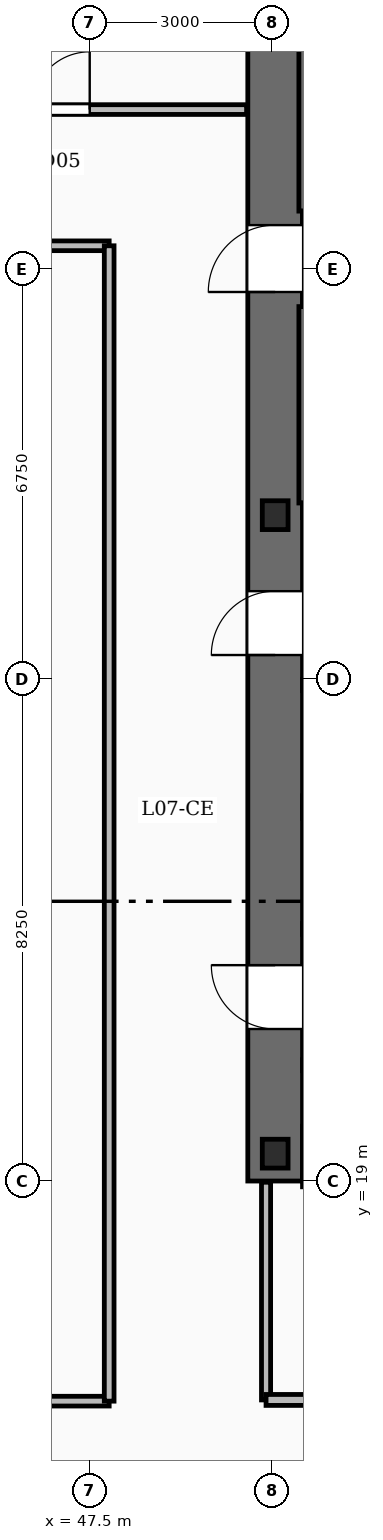
"""IFC4 building model, lengths in metres.
Left out: names, types, materials, properties, quantities, classifications, styles, units other than length and angle.
Written with IfcOpenShell. Run it as: python <this file> out.ifc"""

import sys

from ifc_helpers import new_model, si_unit, direction, frame, frame_2d, origin, origin_2d, place, context, subcontext, project, spatial, rectangle, i_section, extrude, element, fill, save


model = new_model("IFC4")
c1 = context("Model", 3, precision=1e-05, world=origin(), true_north=direction((0.0, 1.0)))
c2 = subcontext(c1, "Body", "Model", "MODEL_VIEW")
j1 = project(units=[si_unit("LENGTHUNIT", "METRE"), si_unit("PLANEANGLEUNIT", "RADIAN")], contexts=[c1])
p1 = place(None, origin())
s1 = spatial("IfcSite", under=j1, at=p1, CompositionType="ELEMENT")
p2 = place(p1, origin())
s2 = spatial("IfcBuilding", under=s1, at=p2, CompositionType="ELEMENT")
p3 = place(p2, frame((0.0, 0.0, 42.0)))
s3 = spatial("IfcBuildingStorey", under=s2, at=p3, CompositionType="ELEMENT", Elevation=42.0)
p4 = place(p3, frame((50.55, 19.0, -0.45), z_axis=(0.0, 0.0, 1.0), x_axis=(0.0, 1.0, 0.0)))
e1 = element("IfcWall", 1, at=p4, inside=s3, PredefinedType="SHEAR", context=c2, shape_type="SweptSolid", body=[
    extrude(rectangle(XDim=20.8, YDim=0.9, at=frame_2d((10.4, 0.0))), origin(), (0.0, 0.0, 1.0), 3.93),
])
p5 = place(p4, frame((2.5, 0.0, 0.45)))
e2 = element("IfcOpeningElement", 2, at=p5, cuts=e1, PredefinedType="OPENING", context=c2, shape_type="SweptSolid", body=[
    extrude(rectangle(XDim=1.05, YDim=2.15, at=frame_2d((0.525, 1.075))), frame((0.0, 0.46, 0.0), z_axis=(0.0, -1.0, 0.0), x_axis=(1.0, 0.0, 0.0)), (0.0, 0.0, 1.0), 0.92),
])
p6 = place(p4, frame((8.65, 0.0, 0.45)))
e3 = element("IfcOpeningElement", 3, at=p6, cuts=e1, PredefinedType="OPENING", context=c2, shape_type="SweptSolid", body=[
    extrude(rectangle(XDim=1.05, YDim=2.15, at=frame_2d((0.525, 1.075))), frame((0.0, 0.46, 0.0), z_axis=(0.0, -1.0, 0.0), x_axis=(1.0, 0.0, 0.0)), (0.0, 0.0, 1.0), 0.92),
])
p7 = place(p4, frame((14.62, 0.0, 0.45)))
e4 = element("IfcOpeningElement", 4, at=p7, cuts=e1, PredefinedType="OPENING", context=c2, shape_type="SweptSolid", body=[
    extrude(rectangle(XDim=1.1, YDim=2.15, at=frame_2d((0.55, 1.075))), frame((0.0, 0.46, 0.0), z_axis=(0.0, -1.0, 0.0), x_axis=(1.0, 0.0, 0.0)), (0.0, 0.0, 1.0), 0.92),
])
p8 = place(p3, frame((51.0, 19.45, -0.45), z_axis=(0.0, 0.0, 1.0), x_axis=(1.0, 0.0, 0.0)))
e5 = element("IfcWall", 5, at=p8, inside=s3, PredefinedType="SHEAR", context=c2, shape_type="SweptSolid", body=[
    extrude(rectangle(XDim=8.9, YDim=0.9, at=frame_2d((4.45, 0.0))), origin(), (0.0, 0.0, 1.0), 3.93),
])
for number, where, z_axis, x_axis in (
    (6, (50.55, 19.45, -0.45), (0.0, 0.0, 1.0), (1.0, 0.0, 0.0)),
    (7, (50.55, 29.95, -0.45), (0.0, 0.0, 1.0), (1.0, 0.0, 0.0)),
):
    element("IfcColumn", number, at=place(p3, frame(where, z_axis=z_axis, x_axis=x_axis)), inside=s3, PredefinedType="COLUMN", context=c2, shape_type="SweptSolid", body=[
        extrude(i_section(OverallWidth=0.424, OverallDepth=0.474, WebThickness=0.048, FlangeThickness=0.077, FilletRadius=0.02, at=origin_2d()), origin(), (0.0, 0.0, 1.0), 3.93),
    ])
p9 = place(p3, frame((59.9, 30.03, 0.0), z_axis=(0.0, 0.0, 1.0), x_axis=(-1.0, 0.0, 0.0)))
e8 = element("IfcWall", 8, at=p9, inside=s3, PredefinedType="SOLIDWALL", context=c2, shape_type="SweptSolid", body=[
    extrude(rectangle(XDim=8.9, YDim=0.24, at=frame_2d((4.45, 0.0))), origin(), (0.0, 0.0, 1.0), 3.48),
])
p10 = place(p9, frame((7.38, 0.0, 0.0)))
e9 = element("IfcOpeningElement", 9, at=p10, cuts=e8, PredefinedType="OPENING", context=c2, shape_type="SweptSolid", body=[
    extrude(rectangle(XDim=1.1, YDim=2.15, at=frame_2d((0.55, 1.075))), frame((0.0, 0.13, 0.0), z_axis=(0.0, -1.0, 0.0), x_axis=(1.0, 0.0, 0.0)), (0.0, 0.0, 1.0), 0.26),
])
p11 = place(p3, frame((51.0, 33.5, 0.0), z_axis=(0.0, 0.0, 1.0), x_axis=(1.0, 0.0, 0.0)))
e10 = element("IfcWall", 10, at=p11, inside=s3, PredefinedType="SOLIDWALL", context=c2, shape_type="SweptSolid", body=[
    extrude(rectangle(XDim=8.9, YDim=0.24, at=frame_2d((4.45, 0.0))), origin(), (0.0, 0.0, 1.0), 3.48),
])
p12 = place(p3, frame((51.06, 30.15, 0.0), z_axis=(0.0, 0.0, 1.0), x_axis=(0.0, 1.0, 0.0)))
e11 = element("IfcWall", 11, at=p12, inside=s3, PredefinedType="SOLIDWALL", context=c2, shape_type="SweptSolid", body=[
    extrude(rectangle(XDim=3.23, YDim=0.24, at=frame_2d((1.615, 0.0))), origin(), (0.0, 0.0, 1.0), 3.48),
])
p13 = place(p3, frame((59.9, 34.83, 0.0), z_axis=(0.0, 0.0, 1.0), x_axis=(-1.0, 0.0, 0.0)))
e12 = element("IfcWall", 12, at=p13, inside=s3, PredefinedType="SOLIDWALL", context=c2, shape_type="SweptSolid", body=[
    extrude(rectangle(XDim=8.9, YDim=0.24, at=frame_2d((4.45, 0.0))), origin(), (0.0, 0.0, 1.0), 3.48),
])
p14 = place(p13, frame((7.42, 0.0, 0.0)))
e13 = element("IfcOpeningElement", 13, at=p14, cuts=e12, PredefinedType="OPENING", context=c2, shape_type="SweptSolid", body=[
    extrude(rectangle(XDim=1.1, YDim=2.15, at=frame_2d((0.55, 1.075))), frame((0.0, 0.13, 0.0), z_axis=(0.0, -1.0, 0.0), x_axis=(1.0, 0.0, 0.0)), (0.0, 0.0, 1.0), 0.26),
])
p15 = place(p3, frame((51.06, 34.95, 0.0), z_axis=(0.0, 0.0, 1.0), x_axis=(0.0, 1.0, 0.0)))
e14 = element("IfcWall", 14, at=p15, inside=s3, PredefinedType="SOLIDWALL", context=c2, shape_type="SweptSolid", body=[
    extrude(rectangle(XDim=3.15, YDim=0.24, at=frame_2d((1.575, 0.0))), origin(), (0.0, 0.0, 1.0), 3.48),
])
p16 = place(p3, frame((51.0, 20.905, 0.0), z_axis=(0.0, 0.0, 1.0), x_axis=(1.0, 0.0, 0.0)))
e15 = element("IfcWall", 15, at=p16, inside=s3, PredefinedType="SOLIDWALL", context=c2, shape_type="SweptSolid", body=[
    extrude(rectangle(XDim=2.79, YDim=0.18, at=frame_2d((1.395, 0.0))), origin(), (0.0, 0.0, 1.0), 3.48),
])
p17 = place(p16, frame((0.86, 0.0, 0.0)))
e16 = element("IfcOpeningElement", 16, at=p17, cuts=e15, PredefinedType="OPENING", context=c2, shape_type="SweptSolid", body=[
    extrude(rectangle(XDim=1.2, YDim=2.2, at=frame_2d((0.6, 1.1))), frame((0.0, 0.1, 0.0), z_axis=(0.0, -1.0, 0.0), x_axis=(1.0, 0.0, 0.0)), (0.0, 0.0, 1.0), 0.2),
])
p18 = place(p3, frame((51.0, 18.995, 0.0), z_axis=(0.0, 0.0, 1.0), x_axis=(1.0, 0.0, 0.0)))
e17 = element("IfcWall", 17, at=p18, inside=s3, PredefinedType="SOLIDWALL", context=c2, shape_type="SweptSolid", body=[
    extrude(rectangle(XDim=2.79, YDim=0.18, at=frame_2d((1.395, 0.0))), origin(), (0.0, 0.0, 1.0), 3.48),
])
p19 = place(p3, frame((51.0, 25.055, 0.0), z_axis=(0.0, 0.0, 1.0), x_axis=(1.0, 0.0, 0.0)))
e18 = element("IfcWall", 18, at=p19, inside=s3, PredefinedType="SOLIDWALL", context=c2, shape_type="SweptSolid", body=[
    extrude(rectangle(XDim=2.778, YDim=0.18, at=frame_2d((1.389, 0.0))), origin(), (0.0, 0.0, 1.0), 3.48),
])
p20 = place(p3, frame((51.0, 23.145, 0.0), z_axis=(0.0, 0.0, 1.0), x_axis=(1.0, 0.0, 0.0)))
e19 = element("IfcWall", 19, at=p20, inside=s3, PredefinedType="SOLIDWALL", context=c2, shape_type="SweptSolid", body=[
    extrude(rectangle(XDim=2.778, YDim=0.18, at=frame_2d((1.389, 0.0))), origin(), (0.0, 0.0, 1.0), 3.48),
])
p21 = place(p20, frame((0.86, 0.0, 0.0)))
e20 = element("IfcOpeningElement", 20, at=p21, cuts=e19, PredefinedType="OPENING", context=c2, shape_type="SweptSolid", body=[
    extrude(rectangle(XDim=1.2, YDim=2.2, at=frame_2d((0.6, 1.1))), frame((0.0, 0.1, 0.0), z_axis=(0.0, -1.0, 0.0), x_axis=(1.0, 0.0, 0.0)), (0.0, 0.0, 1.0), 0.2),
])
p22 = place(p3, frame((51.0, 27.155, 0.0), z_axis=(0.0, 0.0, 1.0), x_axis=(1.0, 0.0, 0.0)))
e21 = element("IfcWall", 21, at=p22, inside=s3, PredefinedType="SOLIDWALL", context=c2, shape_type="SweptSolid", body=[
    extrude(rectangle(XDim=2.865, YDim=0.18, at=frame_2d((1.433, 0.0))), origin(), (0.0, 0.0, 1.0), 3.48),
])
p23 = place(p22, frame((0.785, 0.0, 0.0)))
e22 = element("IfcOpeningElement", 22, at=p23, cuts=e21, PredefinedType="OPENING", context=c2, shape_type="SweptSolid", body=[
    extrude(rectangle(XDim=1.35, YDim=2.3, at=frame_2d((0.675, 1.15))), frame((0.0, 0.1, 0.0), z_axis=(0.0, -1.0, 0.0), x_axis=(1.0, 0.0, 0.0)), (0.0, 0.0, 1.0), 0.2),
])
p24 = place(p3, frame((51.0, 25.245, 0.0), z_axis=(0.0, 0.0, 1.0), x_axis=(1.0, 0.0, 0.0)))
e23 = element("IfcWall", 23, at=p24, inside=s3, PredefinedType="SOLIDWALL", context=c2, shape_type="SweptSolid", body=[
    extrude(rectangle(XDim=2.865, YDim=0.18, at=frame_2d((1.433, 0.0))), origin(), (0.0, 0.0, 1.0), 3.48),
])
p25 = place(p3, frame((50.4, 15.4, 0.0), z_axis=(0.0, 0.0, 1.0), x_axis=(1.0, 0.0, 0.0)))
e24 = element("IfcWall", 24, at=p25, inside=s3, PredefinedType="SOLIDWALL", context=c2, shape_type="SweptSolid", body=[
    extrude(rectangle(XDim=10.0, YDim=0.18, at=frame_2d((5.0, 0.0))), origin(), (0.0, 0.0, 1.0), 2.54),
])
p26 = place(p25, frame((1.19, 0.0, 0.0)))
e25 = element("IfcOpeningElement", 25, at=p26, cuts=e24, PredefinedType="OPENING", context=c2, shape_type="SweptSolid", body=[
    extrude(rectangle(XDim=0.92, YDim=2.1, at=frame_2d((0.46, 1.05))), frame((0.0, 0.1, 0.0), z_axis=(0.0, -1.0, 0.0), x_axis=(1.0, 0.0, 0.0)), (0.0, 0.0, 1.0), 0.2),
])
p27 = place(p25, frame((4.54, 0.0, 0.0)))
e26 = element("IfcOpeningElement", 26, at=p27, cuts=e24, PredefinedType="OPENING", context=c2, shape_type="SweptSolid", body=[
    extrude(rectangle(XDim=0.92, YDim=2.1, at=frame_2d((0.46, 1.05))), frame((0.0, 0.1, 0.0), z_axis=(0.0, -1.0, 0.0), x_axis=(1.0, 0.0, 0.0)), (0.0, 0.0, 1.0), 0.2),
])
p28 = place(p25, frame((7.92, 0.0, 0.0)))
e27 = element("IfcOpeningElement", 27, at=p28, cuts=e24, PredefinedType="OPENING", context=c2, shape_type="SweptSolid", body=[
    extrude(rectangle(XDim=0.86, YDim=2.05, at=frame_2d((0.43, 1.025))), frame((0.0, 0.1, 0.0), z_axis=(0.0, -1.0, 0.0), x_axis=(1.0, 0.0, 0.0)), (0.0, 0.0, 1.0), 0.2),
])
p29 = place(p3, frame((50.4, 15.4, 0.0), z_axis=(0.0, 0.0, 1.0), x_axis=(0.0, 1.0, 0.0)))
e28 = element("IfcWall", 28, at=p29, inside=s3, PredefinedType="PARTITIONING", context=c2, shape_type="SweptSolid", body=[
    extrude(rectangle(XDim=3.58, YDim=0.15, at=frame_2d((1.79, 0.0))), origin(), (0.0, 0.0, 1.0), 2.54),
])
p30 = place(p3, frame((24.82, 36.62, 0.0), z_axis=(0.0, 0.0, 1.0), x_axis=(1.0, 0.0, 0.0)))
e29 = element("IfcWall", 29, at=p30, inside=s3, PredefinedType="PARTITIONING", context=c2, shape_type="SweptSolid", body=[
    extrude(rectangle(XDim=25.26, YDim=0.16, at=frame_2d((12.63, 0.0))), origin(), (0.0, 0.0, 1.0), 2.54),
])
p31 = place(p30, frame((2.63, 0.0, 0.0)))
e30 = element("IfcOpeningElement", 30, at=p31, cuts=e29, PredefinedType="OPENING", context=c2, shape_type="SweptSolid", body=[
    extrude(rectangle(XDim=0.95, YDim=2.15, at=frame_2d((0.475, 1.075))), frame((0.0, 0.09, 0.0), z_axis=(0.0, -1.0, 0.0), x_axis=(1.0, 0.0, 0.0)), (0.0, 0.0, 1.0), 0.18),
])
p32 = place(p30, frame((12.205, 0.0, 0.0)))
e31 = element("IfcOpeningElement", 31, at=p32, cuts=e29, PredefinedType="OPENING", context=c2, shape_type="SweptSolid", body=[
    extrude(rectangle(XDim=0.95, YDim=2.15, at=frame_2d((0.475, 1.075))), frame((0.0, 0.09, 0.0), z_axis=(0.0, -1.0, 0.0), x_axis=(1.0, 0.0, 0.0)), (0.0, 0.0, 1.0), 0.18),
])
p33 = place(p30, frame((21.73, 0.0, 0.0)))
e32 = element("IfcOpeningElement", 32, at=p33, cuts=e29, PredefinedType="OPENING", context=c2, shape_type="SweptSolid", body=[
    extrude(rectangle(XDim=0.95, YDim=2.15, at=frame_2d((0.475, 1.075))), frame((0.0, 0.09, 0.0), z_axis=(0.0, -1.0, 0.0), x_axis=(1.0, 0.0, 0.0)), (0.0, 0.0, 1.0), 0.18),
])
p34 = place(p3, frame((27.08, 15.38, 0.0), z_axis=(0.0, 0.0, 1.0), x_axis=(1.0, 0.0, 0.0)))
e33 = element("IfcWall", 33, at=p34, inside=s3, PredefinedType="PARTITIONING", context=c2, shape_type="SweptSolid", body=[
    extrude(rectangle(XDim=20.74, YDim=0.16, at=frame_2d((10.37, 0.0))), origin(), (0.0, 0.0, 1.0), 2.54),
])
p35 = place(p34, frame((1.495, 0.0, 0.0)))
e34 = element("IfcOpeningElement", 34, at=p35, cuts=e33, PredefinedType="OPENING", context=c2, shape_type="SweptSolid", body=[
    extrude(rectangle(XDim=0.95, YDim=2.15, at=frame_2d((0.475, 1.075))), frame((0.0, 0.09, 0.0), z_axis=(0.0, -1.0, 0.0), x_axis=(1.0, 0.0, 0.0)), (0.0, 0.0, 1.0), 0.18),
])
p36 = place(p34, frame((9.945, 0.0, 0.0)))
e35 = element("IfcOpeningElement", 35, at=p36, cuts=e33, PredefinedType="OPENING", context=c2, shape_type="SweptSolid", body=[
    extrude(rectangle(XDim=0.95, YDim=2.15, at=frame_2d((0.475, 1.075))), frame((0.0, 0.09, 0.0), z_axis=(0.0, -1.0, 0.0), x_axis=(1.0, 0.0, 0.0)), (0.0, 0.0, 1.0), 0.18),
])
p37 = place(p34, frame((18.345, 0.0, 0.0)))
e36 = element("IfcOpeningElement", 36, at=p37, cuts=e33, PredefinedType="OPENING", context=c2, shape_type="SweptSolid", body=[
    extrude(rectangle(XDim=0.95, YDim=2.15, at=frame_2d((0.475, 1.075))), frame((0.0, 0.09, 0.0), z_axis=(0.0, -1.0, 0.0), x_axis=(1.0, 0.0, 0.0)), (0.0, 0.0, 1.0), 0.18),
])
p38 = place(p3, frame((27.08, 34.38, 0.0), z_axis=(0.0, 0.0, 1.0), x_axis=(1.0, 0.0, 0.0)))
e37 = element("IfcWall", 37, at=p38, inside=s3, PredefinedType="PARTITIONING", context=c2, shape_type="SweptSolid", body=[
    extrude(rectangle(XDim=20.74, YDim=0.16, at=frame_2d((10.37, 0.0))), origin(), (0.0, 0.0, 1.0), 2.54),
])
p39 = place(p3, frame((47.82, 15.38, 0.0), z_axis=(0.0, 0.0, 1.0), x_axis=(0.0, 1.0, 0.0)))
e38 = element("IfcWall", 38, at=p39, inside=s3, PredefinedType="PARTITIONING", context=c2, shape_type="SweptSolid", body=[
    extrude(rectangle(XDim=19.0, YDim=0.16, at=frame_2d((9.5, 0.0))), origin(), (0.0, 0.0, 1.0), 2.54),
])
p40 = place(p5, origin())
e39 = element("IfcDoor", 39, at=p40, inside=s3, OperationType="SINGLE_SWING_RIGHT", PredefinedType="DOOR", context=c2, shape_type="SweptSolid", body=[
    extrude(rectangle(XDim=1.05, YDim=2.15, at=frame_2d((0.525, 1.075))), frame((0.0, 0.025, 0.0), z_axis=(0.0, -1.0, 0.0), x_axis=(1.0, 0.0, 0.0)), (0.0, 0.0, 1.0), 0.05),
])
fill(e2, e39)
p41 = place(p6, origin())
e40 = element("IfcDoor", 40, at=p41, inside=s3, OperationType="SINGLE_SWING_LEFT", PredefinedType="DOOR", context=c2, shape_type="SweptSolid", body=[
    extrude(rectangle(XDim=1.05, YDim=2.15, at=frame_2d((0.525, 1.075))), frame((0.0, 0.025, 0.0), z_axis=(0.0, -1.0, 0.0), x_axis=(1.0, 0.0, 0.0)), (0.0, 0.0, 1.0), 0.05),
])
fill(e3, e40)
p42 = place(p7, origin())
e41 = element("IfcDoor", 41, at=p42, inside=s3, OperationType="SINGLE_SWING_LEFT", PredefinedType="DOOR", context=c2, shape_type="SweptSolid", body=[
    extrude(rectangle(XDim=1.1, YDim=2.15, at=frame_2d((0.55, 1.075))), frame((0.0, 0.025, 0.0), z_axis=(0.0, -1.0, 0.0), x_axis=(1.0, 0.0, 0.0)), (0.0, 0.0, 1.0), 0.05),
])
fill(e4, e41)
p43 = place(p33, origin())
e42 = element("IfcDoor", 42, at=p43, inside=s3, OperationType="SINGLE_SWING_RIGHT", PredefinedType="DOOR", context=c2, shape_type="SweptSolid", body=[
    extrude(rectangle(XDim=0.95, YDim=2.15, at=frame_2d((0.475, 1.075))), frame((0.0, 0.025, 0.0), z_axis=(0.0, -1.0, 0.0), x_axis=(1.0, 0.0, 0.0)), (0.0, 0.0, 1.0), 0.05),
])
fill(e32, e42)
save(model, sys.argv[1])
